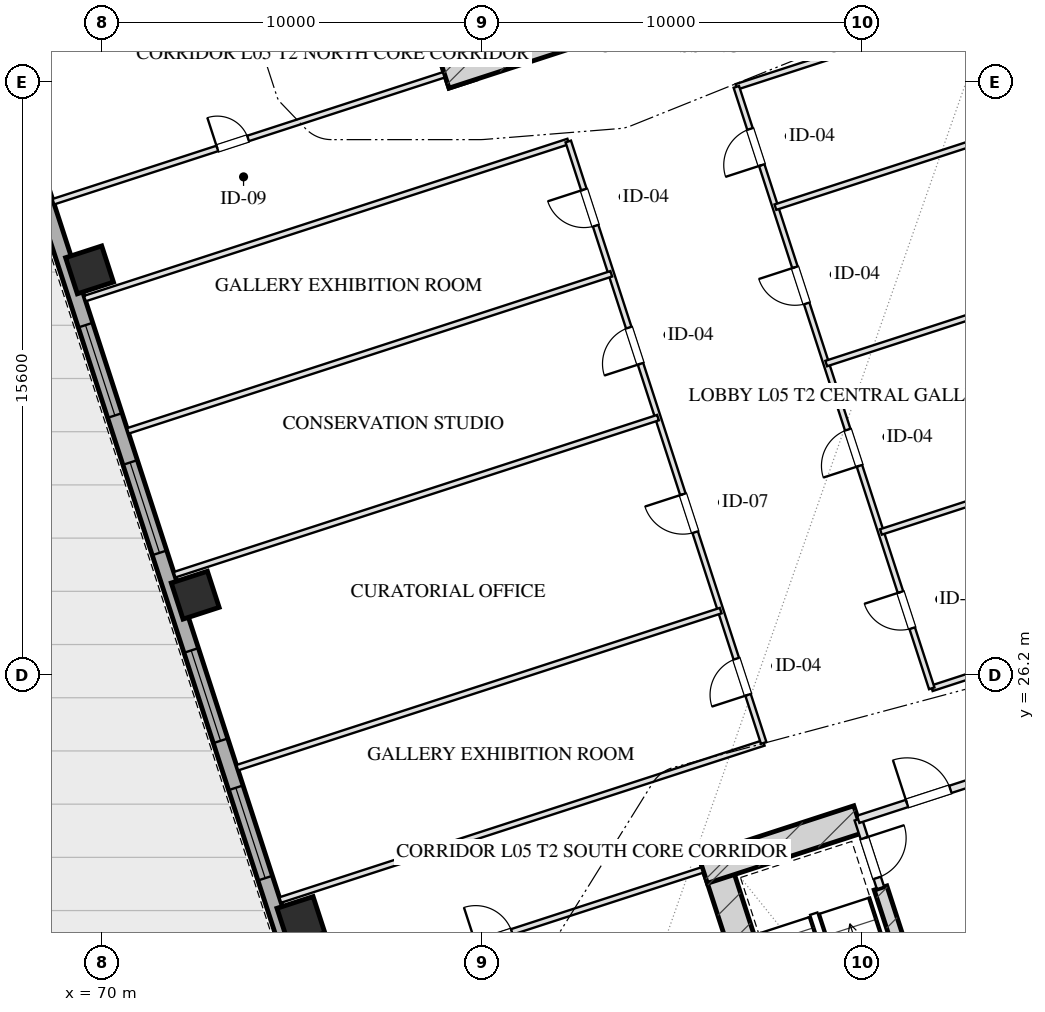
"""IFC4 building model, lengths in metres.
Left out: names, types, materials, properties, quantities, classifications, styles, units other than length and angle.
Written with IfcOpenShell. Run it as: python <this file> out.ifc"""

import sys

from ifc_helpers import new_model, si_unit, direction, frame, frame_2d, origin, origin_2d, place, context, subcontext, project, spatial, rectangle, hollow_rectangle, extrude, element, fill, save


model = new_model("IFC4")
c1 = context("Model", 3, precision=1e-05, world=origin(), true_north=direction((0.0, 1.0)))
c2 = subcontext(c1, "Body", "Model", "MODEL_VIEW")
j1 = project(units=[si_unit("LENGTHUNIT", "METRE"), si_unit("PLANEANGLEUNIT", "RADIAN")], contexts=[c1])
p1 = place(None, origin())
s1 = spatial("IfcSite", under=j1, at=p1, CompositionType="ELEMENT")
p2 = place(p1, origin())
s2 = spatial("IfcBuilding", under=s1, at=p2, CompositionType="ELEMENT")
p3 = place(p2, frame((0.0, 0.0, 26.0)))
s3 = spatial("IfcBuildingStorey", under=s2, at=p3, CompositionType="ELEMENT", Elevation=26.0)
p4 = place(p3, frame((86.055, 21.546, 0.0), z_axis=(0.0, 0.0, 1.0), x_axis=(0.309023585745, -0.951054374604, 0.0)))
e1 = element("IfcWall", 1, at=p4, inside=s3, PredefinedType="SHEAR", context=c2, shape_type="SweptSolid", body=[
    extrude(rectangle(XDim=9.63, YDim=0.75, at=frame_2d((4.815, 0.0))), origin(), (0.0, 0.0, 1.0), 4.0),
])
p5 = place(p3, frame((90.486, 20.594, 0.0), z_axis=(0.0, 0.0, 1.0), x_axis=(0.309020428229, -0.951055400562, 0.0)))
e2 = element("IfcWall", 2, at=p5, inside=s3, PredefinedType="SHEAR", context=c2, shape_type="SweptSolid", body=[
    extrude(rectangle(XDim=6.98, YDim=0.35, at=frame_2d((3.49, 0.0))), origin(), (0.0, 0.0, 1.0), 4.0),
])
p6 = place(p3, frame((85.814, 21.074, 0.0), z_axis=(0.0, 0.0, 1.0), x_axis=(0.95106580992, 0.308988390074, 0.0)))
e3 = element("IfcWall", 3, at=p6, inside=s3, PredefinedType="SHEAR", context=c2, shape_type="SweptSolid", body=[
    extrude(rectangle(XDim=4.295, YDim=0.75, at=frame_2d((2.147, 0.0))), origin(), (0.0, 0.0, 1.0), 4.0),
])
p7 = place(p3, frame((79.489, 41.756, 0.0), z_axis=(0.0, 0.0, 1.0), x_axis=(-0.309016134813, 0.951056795583, 0.0)))
e4 = element("IfcWall", 4, at=p7, inside=s3, PredefinedType="SHEAR", context=c2, shape_type="SweptSolid", body=[
    extrude(rectangle(XDim=9.63, YDim=0.75, at=frame_2d((4.815, 0.0))), origin(), (0.0, 0.0, 1.0), 4.0),
])
p8 = place(p3, frame((79.016, 41.997, 0.0), z_axis=(0.0, 0.0, 1.0), x_axis=(0.95106038264, 0.309005094736, 0.0)))
e5 = element("IfcWall", 5, at=p8, inside=s3, PredefinedType="SHEAR", context=c2, shape_type="SweptSolid", body=[
    extrude(rectangle(XDim=4.295, YDim=0.75, at=frame_2d((2.147, 0.0))), origin(), (0.0, 0.0, 1.0), 4.0),
])
for number, where, z_axis, x_axis in (
    (6, (75.234, 19.739, 0.0), (0.0, 0.0, 1.0), (0.951, 0.309, 0.0)),
    (7, (72.453, 28.299, 0.0), (0.0, 0.0, 1.0), (0.951, 0.309, 0.0)),
    (8, (69.672, 36.858, 0.0), (0.0, 0.0, 1.0), (0.951, 0.309, 0.0)),
):
    element("IfcColumn", number, at=place(p3, frame(where, z_axis=z_axis, x_axis=x_axis)), inside=s3, PredefinedType="COLUMN", context=c2, shape_type="SweptSolid", body=[
        extrude(hollow_rectangle(XDim=1.0, YDim=1.0, WallThickness=0.036, at=origin_2d()), origin(), (0.0, 0.0, 1.0), 4.001),
    ])
p9 = place(p3, frame((79.655, 4.352, 0.0), z_axis=(0.0, 0.0, 1.0), x_axis=(-0.309014526607, 0.951057318118, 0.0)))
e9 = element("IfcWall", 9, at=p9, inside=s3, PredefinedType="SOLIDWALL", context=c2, shape_type="SweptSolid", body=[
    extrude(rectangle(XDim=50.0, YDim=0.4, at=frame_2d((25.0, 0.0))), origin(), (0.0, 0.0, 1.0), 3.16),
])
p10 = place(p9, frame((17.35, 0.0, 0.75)))
e10 = element("IfcOpeningElement", 10, at=p10, cuts=e9, PredefinedType="OPENING", context=c2, shape_type="SweptSolid", body=[
    extrude(rectangle(XDim=2.5, YDim=1.75, at=frame_2d((1.25, 0.875))), frame((0.0, 0.21, 0.0), z_axis=(0.0, -1.0, 0.0), x_axis=(1.0, 0.0, 0.0)), (0.0, 0.0, 1.0), 0.42),
])
p11 = place(p9, frame((21.15, 0.0, 0.75)))
e11 = element("IfcOpeningElement", 11, at=p11, cuts=e9, PredefinedType="OPENING", context=c2, shape_type="SweptSolid", body=[
    extrude(rectangle(XDim=2.5, YDim=1.75, at=frame_2d((1.25, 0.875))), frame((0.0, 0.21, 0.0), z_axis=(0.0, -1.0, 0.0), x_axis=(1.0, 0.0, 0.0)), (0.0, 0.0, 1.0), 0.42),
])
p12 = place(p9, frame((26.35, 0.0, 0.75)))
e12 = element("IfcOpeningElement", 12, at=p12, cuts=e9, PredefinedType="OPENING", context=c2, shape_type="SweptSolid", body=[
    extrude(rectangle(XDim=2.5, YDim=1.75, at=frame_2d((1.25, 0.875))), frame((0.0, 0.21, 0.0), z_axis=(0.0, -1.0, 0.0), x_axis=(1.0, 0.0, 0.0)), (0.0, 0.0, 1.0), 0.42),
])
p13 = place(p9, frame((30.15, 0.0, 0.75)))
e13 = element("IfcOpeningElement", 13, at=p13, cuts=e9, PredefinedType="OPENING", context=c2, shape_type="SweptSolid", body=[
    extrude(rectangle(XDim=2.5, YDim=1.75, at=frame_2d((1.25, 0.875))), frame((0.0, 0.21, 0.0), z_axis=(0.0, -1.0, 0.0), x_axis=(1.0, 0.0, 0.0)), (0.0, 0.0, 1.0), 0.42),
])
p14 = place(p3, frame((89.899, 22.401, 0.0), z_axis=(0.0, 0.0, 1.0), x_axis=(0.308932062672, -0.951084108086, 0.0)))
e14 = element("IfcWall", 14, at=p14, inside=s3, PredefinedType="PARTITIONING", context=c2, shape_type="SweptSolid", body=[
    extrude(rectangle(XDim=1.9, YDim=0.2, at=frame_2d((0.95, 0.0))), origin(), (0.0, 0.0, 1.0), 3.725),
])
p15 = place(p14, frame((0.52, 0.0, 0.0)))
e15 = element("IfcOpeningElement", 15, at=p15, cuts=e14, PredefinedType="OPENING", context=c2, shape_type="SweptSolid", body=[
    extrude(rectangle(XDim=1.1, YDim=2.05, at=frame_2d((0.55, 1.025))), frame((0.0, 0.11, 0.0), z_axis=(0.0, -1.0, 0.0), x_axis=(1.0, 0.0, 0.0)), (0.0, 0.0, 1.0), 0.22),
])
p16 = place(p3, frame((89.899, 22.401, 0.0), z_axis=(0.0, 0.0, 1.0), x_axis=(0.951046716504, 0.309047153403, 0.0)))
e16 = element("IfcWall", 16, at=p16, inside=s3, PredefinedType="PARTITIONING", context=c2, shape_type="SweptSolid", body=[
    extrude(rectangle(XDim=3.83, YDim=0.2, at=frame_2d((1.915, 0.0))), origin(), (0.0, 0.0, 1.0), 3.725),
])
p17 = place(p16, frame((1.35, 0.0, 0.0)))
e17 = element("IfcOpeningElement", 17, at=p17, cuts=e16, PredefinedType="OPENING", context=c2, shape_type="SweptSolid", body=[
    extrude(rectangle(XDim=1.2, YDim=2.05, at=frame_2d((0.6, 1.025))), frame((0.0, 0.11, 0.0), z_axis=(0.0, -1.0, 0.0), x_axis=(1.0, 0.0, 0.0)), (0.0, 0.0, 1.0), 0.22),
])
p18 = place(p3, frame((75.519, 17.729, 0.0), z_axis=(0.0, 0.0, 1.0), x_axis=(0.951056658866, 0.309016555588, 0.0)))
e18 = element("IfcWall", 18, at=p18, inside=s3, PredefinedType="PARTITIONING", context=c2, shape_type="SweptSolid", body=[
    extrude(rectangle(XDim=10.8, YDim=0.15, at=frame_2d((5.4, 0.0))), origin(), (0.0, 0.0, 1.0), 3.725),
])
p19 = place(p18, frame((4.536, 0.0, 0.0)))
e19 = element("IfcOpeningElement", 19, at=p19, cuts=e18, PredefinedType="OPENING", context=c2, shape_type="SweptSolid", body=[
    extrude(rectangle(XDim=1.0, YDim=2.05, at=frame_2d((0.5, 1.025))), frame((0.0, 0.085, 0.0), z_axis=(0.0, -1.0, 0.0), x_axis=(1.0, 0.0, 0.0)), (0.0, 0.0, 1.0), 0.17),
])
p20 = place(p3, frame((68.721, 38.652, 0.0), z_axis=(0.0, 0.0, 1.0), x_axis=(0.951056658866, 0.309016555588, 0.0)))
e20 = element("IfcWall", 20, at=p20, inside=s3, PredefinedType="PARTITIONING", context=c2, shape_type="SweptSolid", body=[
    extrude(rectangle(XDim=10.8, YDim=0.15, at=frame_2d((5.4, 0.0))), origin(), (0.0, 0.0, 1.0), 3.725),
])
p21 = place(p20, frame((4.536, 0.0, 0.0)))
e21 = element("IfcOpeningElement", 21, at=p21, cuts=e20, PredefinedType="OPENING", context=c2, shape_type="SweptSolid", body=[
    extrude(rectangle(XDim=0.85, YDim=2.05, at=frame_2d((0.425, 1.025))), frame((0.0, 0.085, 0.0), z_axis=(0.0, -1.0, 0.0), x_axis=(1.0, 0.0, 0.0)), (0.0, 0.0, 1.0), 0.17),
])
p22 = place(p3, frame((74.691, 20.278, 0.0), z_axis=(0.0, 0.0, 1.0), x_axis=(0.951052712421, 0.309028701251, 0.0)))
e22 = element("IfcWall", 22, at=p22, inside=s3, PredefinedType="PARTITIONING", context=c2, shape_type="SweptSolid", body=[
    extrude(rectangle(XDim=13.375, YDim=0.15, at=frame_2d((6.688, 0.0))), origin(), (0.0, 0.0, 1.0), 3.725),
])
p23 = place(p3, frame((91.834, 25.848, 0.0), z_axis=(0.0, 0.0, 1.0), x_axis=(0.951055605195, 0.309019798438, 0.0)))
e23 = element("IfcWall", 23, at=p23, inside=s3, PredefinedType="PARTITIONING", context=c2, shape_type="SweptSolid", body=[
    extrude(rectangle(XDim=19.575, YDim=0.15, at=frame_2d((9.788, 0.0))), origin(), (0.0, 0.0, 1.0), 3.725),
])
p24 = place(p3, frame((69.549, 36.103, 0.0), z_axis=(0.0, 0.0, 1.0), x_axis=(0.951058077006, 0.309012190961, 0.0)))
e24 = element("IfcWall", 24, at=p24, inside=s3, PredefinedType="PARTITIONING", context=c2, shape_type="SweptSolid", body=[
    extrude(rectangle(XDim=13.375, YDim=0.15, at=frame_2d((6.688, 0.0))), origin(), (0.0, 0.0, 1.0), 3.725),
])
p25 = place(p3, frame((86.692, 41.673, 0.0), z_axis=(0.0, 0.0, 1.0), x_axis=(0.951055605195, 0.309019798438, 0.0)))
e25 = element("IfcWall", 25, at=p25, inside=s3, PredefinedType="PARTITIONING", context=c2, shape_type="SweptSolid", body=[
    extrude(rectangle(XDim=19.575, YDim=0.15, at=frame_2d((9.788, 0.0))), origin(), (0.0, 0.0, 1.0), 3.725),
])
p26 = place(p3, frame((87.412, 24.411, 0.0), z_axis=(0.0, 0.0, 1.0), x_axis=(-0.309022042254, 0.951054876125, 0.0)))
e26 = element("IfcWall", 26, at=p26, inside=s3, PredefinedType="PARTITIONING", context=c2, shape_type="SweptSolid", body=[
    extrude(rectangle(XDim=16.64, YDim=0.15, at=frame_2d((8.32, 0.0))), origin(), (0.0, 0.0, 1.0), 3.725),
])
p27 = place(p26, frame((1.33, 0.0, 0.0)))
e27 = element("IfcOpeningElement", 27, at=p27, cuts=e26, PredefinedType="OPENING", context=c2, shape_type="SweptSolid", body=[
    extrude(rectangle(XDim=1.0, YDim=2.05, at=frame_2d((0.5, 1.025))), frame((0.0, 0.085, 0.0), z_axis=(0.0, -1.0, 0.0), x_axis=(1.0, 0.0, 0.0)), (0.0, 0.0, 1.0), 0.17),
])
p28 = place(p26, frame((5.83, 0.0, 0.0)))
e28 = element("IfcOpeningElement", 28, at=p28, cuts=e26, PredefinedType="OPENING", context=c2, shape_type="SweptSolid", body=[
    extrude(rectangle(XDim=1.05, YDim=2.05, at=frame_2d((0.525, 1.025))), frame((0.0, 0.085, 0.0), z_axis=(0.0, -1.0, 0.0), x_axis=(1.0, 0.0, 0.0)), (0.0, 0.0, 1.0), 0.17),
])
p29 = place(p26, frame((10.49, 0.0, 0.0)))
e29 = element("IfcOpeningElement", 29, at=p29, cuts=e26, PredefinedType="OPENING", context=c2, shape_type="SweptSolid", body=[
    extrude(rectangle(XDim=1.0, YDim=2.05, at=frame_2d((0.5, 1.025))), frame((0.0, 0.085, 0.0), z_axis=(0.0, -1.0, 0.0), x_axis=(1.0, 0.0, 0.0)), (0.0, 0.0, 1.0), 0.17),
])
p30 = place(p26, frame((14.31, 0.0, 0.0)))
e30 = element("IfcOpeningElement", 30, at=p30, cuts=e26, PredefinedType="OPENING", context=c2, shape_type="SweptSolid", body=[
    extrude(rectangle(XDim=1.0, YDim=2.05, at=frame_2d((0.5, 1.025))), frame((0.0, 0.085, 0.0), z_axis=(0.0, -1.0, 0.0), x_axis=(1.0, 0.0, 0.0)), (0.0, 0.0, 1.0), 0.17),
])
p31 = place(p3, frame((91.834, 25.848, 0.0), z_axis=(0.0, 0.0, 1.0), x_axis=(-0.30901773025, 0.951056277195, 0.0)))
e31 = element("IfcWall", 31, at=p31, inside=s3, PredefinedType="PARTITIONING", context=c2, shape_type="SweptSolid", body=[
    extrude(rectangle(XDim=16.64, YDim=0.15, at=frame_2d((8.32, 0.0))), origin(), (0.0, 0.0, 1.0), 3.725),
])
p32 = place(p31, frame((1.663, 0.0, 0.0)))
e32 = element("IfcOpeningElement", 32, at=p32, cuts=e31, PredefinedType="OPENING", context=c2, shape_type="SweptSolid", body=[
    extrude(rectangle(XDim=1.0, YDim=2.05, at=frame_2d((0.5, 1.025))), frame((0.0, 0.085, 0.0), z_axis=(0.0, -1.0, 0.0), x_axis=(1.0, 0.0, 0.0)), (0.0, 0.0, 1.0), 0.17),
])
p33 = place(p31, frame((6.156, 0.0, 0.0)))
e33 = element("IfcOpeningElement", 33, at=p33, cuts=e31, PredefinedType="OPENING", context=c2, shape_type="SweptSolid", body=[
    extrude(rectangle(XDim=1.0, YDim=2.05, at=frame_2d((0.5, 1.025))), frame((0.0, 0.085, 0.0), z_axis=(0.0, -1.0, 0.0), x_axis=(1.0, 0.0, 0.0)), (0.0, 0.0, 1.0), 0.17),
])
p34 = place(p31, frame((10.649, 0.0, 0.0)))
e34 = element("IfcOpeningElement", 34, at=p34, cuts=e31, PredefinedType="OPENING", context=c2, shape_type="SweptSolid", body=[
    extrude(rectangle(XDim=1.0, YDim=2.05, at=frame_2d((0.5, 1.025))), frame((0.0, 0.085, 0.0), z_axis=(0.0, -1.0, 0.0), x_axis=(1.0, 0.0, 0.0)), (0.0, 0.0, 1.0), 0.17),
])
p35 = place(p31, frame((14.476, 0.0, 0.0)))
e35 = element("IfcOpeningElement", 35, at=p35, cuts=e31, PredefinedType="OPENING", context=c2, shape_type="SweptSolid", body=[
    extrude(rectangle(XDim=1.0, YDim=2.05, at=frame_2d((0.5, 1.025))), frame((0.0, 0.085, 0.0), z_axis=(0.0, -1.0, 0.0), x_axis=(1.0, 0.0, 0.0)), (0.0, 0.0, 1.0), 0.17),
])
for number, where, z_axis, x_axis in (
    (36, (73.56, 23.759, 0.0), (0.0, 0.0, 1.0), (0.951, 0.309, 0.0)),
    (37, (71.91, 28.837, 0.0), (0.0, 0.0, 1.0), (0.951, 0.309, 0.0)),
):
    element("IfcWall", number, at=place(p3, frame(where, z_axis=z_axis, x_axis=x_axis)), inside=s3, PredefinedType="PARTITIONING", context=c2, shape_type="SweptSolid", body=[
        extrude(rectangle(XDim=13.375, YDim=0.15, at=frame_2d((6.688, 0.0))), origin(), (0.0, 0.0, 1.0), 3.725),
    ])
p36 = place(p3, frame((70.68, 32.622, 0.0), z_axis=(0.0, 0.0, 1.0), x_axis=(0.951056333968, 0.309017555521, 0.0)))
e38 = element("IfcWall", 38, at=p36, inside=s3, PredefinedType="PARTITIONING", context=c2, shape_type="SweptSolid", body=[
    extrude(rectangle(XDim=13.375, YDim=0.15, at=frame_2d((6.688, 0.0))), origin(), (0.0, 0.0, 1.0), 3.725),
])
for number, where, z_axis, x_axis in (
    (39, (90.497, 29.962, 0.0), (0.0, 0.0, 1.0), (0.951, 0.309, 0.0)),
    (40, (89.057, 34.394, 0.0), (0.0, 0.0, 1.0), (0.951, 0.309, 0.0)),
    (41, (87.72, 38.508, 0.0), (0.0, 0.0, 1.0), (0.951, 0.309, 0.0)),
):
    element("IfcWall", number, at=place(p3, frame(where, z_axis=z_axis, x_axis=x_axis)), inside=s3, PredefinedType="PARTITIONING", context=c2, shape_type="SweptSolid", body=[
        extrude(rectangle(XDim=19.575, YDim=0.15, at=frame_2d((9.788, 0.0))), origin(), (0.0, 0.0, 1.0), 3.725),
    ])
p37 = place(p10, origin())
e42 = element("IfcWindow", 42, at=p37, inside=s3, PartitioningType="TRIPLE_PANEL_VERTICAL", PredefinedType="WINDOW", context=c2, shape_type="SweptSolid", body=[
    extrude(rectangle(XDim=2.5, YDim=1.75, at=frame_2d((1.25, 0.875))), frame((0.0, 0.03, 0.0), z_axis=(0.0, -1.0, 0.0), x_axis=(1.0, 0.0, 0.0)), (0.0, 0.0, 1.0), 0.06),
])
fill(e10, e42)
p38 = place(p11, origin())
e43 = element("IfcWindow", 43, at=p38, inside=s3, PartitioningType="TRIPLE_PANEL_VERTICAL", PredefinedType="WINDOW", context=c2, shape_type="SweptSolid", body=[
    extrude(rectangle(XDim=2.5, YDim=1.75, at=frame_2d((1.25, 0.875))), frame((0.0, 0.03, 0.0), z_axis=(0.0, -1.0, 0.0), x_axis=(1.0, 0.0, 0.0)), (0.0, 0.0, 1.0), 0.06),
])
fill(e11, e43)
p39 = place(p12, origin())
e44 = element("IfcWindow", 44, at=p39, inside=s3, PartitioningType="TRIPLE_PANEL_VERTICAL", PredefinedType="WINDOW", context=c2, shape_type="SweptSolid", body=[
    extrude(rectangle(XDim=2.5, YDim=1.75, at=frame_2d((1.25, 0.875))), frame((0.0, 0.03, 0.0), z_axis=(0.0, -1.0, 0.0), x_axis=(1.0, 0.0, 0.0)), (0.0, 0.0, 1.0), 0.06),
])
fill(e12, e44)
p40 = place(p13, origin())
e45 = element("IfcWindow", 45, at=p40, inside=s3, PartitioningType="TRIPLE_PANEL_VERTICAL", PredefinedType="WINDOW", context=c2, shape_type="SweptSolid", body=[
    extrude(rectangle(XDim=2.5, YDim=1.75, at=frame_2d((1.25, 0.875))), frame((0.0, 0.03, 0.0), z_axis=(0.0, -1.0, 0.0), x_axis=(1.0, 0.0, 0.0)), (0.0, 0.0, 1.0), 0.06),
])
fill(e13, e45)
p41 = place(p15, origin())
e46 = element("IfcDoor", 46, at=p41, inside=s3, OperationType="SINGLE_SWING_LEFT", PredefinedType="DOOR", context=c2, shape_type="SweptSolid", body=[
    extrude(rectangle(XDim=1.1, YDim=2.05, at=frame_2d((0.55, 1.025))), frame((0.0, 0.025, 0.0), z_axis=(0.0, -1.0, 0.0), x_axis=(1.0, 0.0, 0.0)), (0.0, 0.0, 1.0), 0.05),
])
fill(e15, e46)
p42 = place(p17, origin())
e47 = element("IfcDoor", 47, at=p42, inside=s3, OperationType="SINGLE_SWING_LEFT", PredefinedType="DOOR", context=c2, shape_type="SweptSolid", body=[
    extrude(rectangle(XDim=1.2, YDim=2.05, at=frame_2d((0.6, 1.025))), frame((0.0, 0.025, 0.0), z_axis=(0.0, -1.0, 0.0), x_axis=(1.0, 0.0, 0.0)), (0.0, 0.0, 1.0), 0.05),
])
fill(e17, e47)
p43 = place(p19, origin())
e48 = element("IfcDoor", 48, at=p43, inside=s3, OperationType="SINGLE_SWING_LEFT", PredefinedType="DOOR", context=c2, shape_type="SweptSolid", body=[
    extrude(rectangle(XDim=1.0, YDim=2.05, at=frame_2d((0.5, 1.025))), frame((0.0, 0.025, 0.0), z_axis=(0.0, -1.0, 0.0), x_axis=(1.0, 0.0, 0.0)), (0.0, 0.0, 1.0), 0.05),
])
fill(e19, e48)
p44 = place(p21, origin())
e49 = element("IfcDoor", 49, at=p44, inside=s3, OperationType="SINGLE_SWING_LEFT", PredefinedType="DOOR", context=c2, shape_type="SweptSolid", body=[
    extrude(rectangle(XDim=0.85, YDim=2.05, at=frame_2d((0.425, 1.025))), frame((0.0, 0.025, 0.0), z_axis=(0.0, -1.0, 0.0), x_axis=(1.0, 0.0, 0.0)), (0.0, 0.0, 1.0), 0.05),
])
fill(e21, e49)
p45 = place(p27, origin())
e50 = element("IfcDoor", 50, at=p45, inside=s3, OperationType="SINGLE_SWING_LEFT", PredefinedType="DOOR", context=c2, shape_type="SweptSolid", body=[
    extrude(rectangle(XDim=1.0, YDim=2.05, at=frame_2d((0.5, 1.025))), frame((0.0, 0.025, 0.0), z_axis=(0.0, -1.0, 0.0), x_axis=(1.0, 0.0, 0.0)), (0.0, 0.0, 1.0), 0.05),
])
fill(e27, e50)
p46 = place(p28, origin())
e51 = element("IfcDoor", 51, at=p46, inside=s3, OperationType="SINGLE_SWING_RIGHT", PredefinedType="DOOR", context=c2, shape_type="SweptSolid", body=[
    extrude(rectangle(XDim=1.05, YDim=2.05, at=frame_2d((0.525, 1.025))), frame((0.0, 0.025, 0.0), z_axis=(0.0, -1.0, 0.0), x_axis=(1.0, 0.0, 0.0)), (0.0, 0.0, 1.0), 0.05),
])
fill(e28, e51)
p47 = place(p29, origin())
e52 = element("IfcDoor", 52, at=p47, inside=s3, OperationType="SINGLE_SWING_LEFT", PredefinedType="DOOR", context=c2, shape_type="SweptSolid", body=[
    extrude(rectangle(XDim=1.0, YDim=2.05, at=frame_2d((0.5, 1.025))), frame((0.0, 0.025, 0.0), z_axis=(0.0, -1.0, 0.0), x_axis=(1.0, 0.0, 0.0)), (0.0, 0.0, 1.0), 0.05),
])
fill(e29, e52)
p48 = place(p30, origin())
e53 = element("IfcDoor", 53, at=p48, inside=s3, OperationType="SINGLE_SWING_RIGHT", PredefinedType="DOOR", context=c2, shape_type="SweptSolid", body=[
    extrude(rectangle(XDim=1.0, YDim=2.05, at=frame_2d((0.5, 1.025))), frame((0.0, 0.025, 0.0), z_axis=(0.0, -1.0, 0.0), x_axis=(1.0, 0.0, 0.0)), (0.0, 0.0, 1.0), 0.05),
])
fill(e30, e53)
p49 = place(p32, origin())
e54 = element("IfcDoor", 54, at=p49, inside=s3, OperationType="SINGLE_SWING_RIGHT", PredefinedType="DOOR", context=c2, shape_type="SweptSolid", body=[
    extrude(rectangle(XDim=1.0, YDim=2.05, at=frame_2d((0.5, 1.025))), frame((0.0, 0.025, 0.0), z_axis=(0.0, -1.0, 0.0), x_axis=(1.0, 0.0, 0.0)), (0.0, 0.0, 1.0), 0.05),
])
fill(e32, e54)
p50 = place(p33, origin())
e55 = element("IfcDoor", 55, at=p50, inside=s3, OperationType="SINGLE_SWING_LEFT", PredefinedType="DOOR", context=c2, shape_type="SweptSolid", body=[
    extrude(rectangle(XDim=1.0, YDim=2.05, at=frame_2d((0.5, 1.025))), frame((0.0, 0.025, 0.0), z_axis=(0.0, -1.0, 0.0), x_axis=(1.0, 0.0, 0.0)), (0.0, 0.0, 1.0), 0.05),
])
fill(e33, e55)
p51 = place(p34, origin())
e56 = element("IfcDoor", 56, at=p51, inside=s3, OperationType="SINGLE_SWING_RIGHT", PredefinedType="DOOR", context=c2, shape_type="SweptSolid", body=[
    extrude(rectangle(XDim=1.0, YDim=2.05, at=frame_2d((0.5, 1.025))), frame((0.0, 0.025, 0.0), z_axis=(0.0, -1.0, 0.0), x_axis=(1.0, 0.0, 0.0)), (0.0, 0.0, 1.0), 0.05),
])
fill(e34, e56)
p52 = place(p35, origin())
e57 = element("IfcDoor", 57, at=p52, inside=s3, OperationType="SINGLE_SWING_LEFT", PredefinedType="DOOR", context=c2, shape_type="SweptSolid", body=[
    extrude(rectangle(XDim=1.0, YDim=2.05, at=frame_2d((0.5, 1.025))), frame((0.0, 0.025, 0.0), z_axis=(0.0, -1.0, 0.0), x_axis=(1.0, 0.0, 0.0)), (0.0, 0.0, 1.0), 0.05),
])
fill(e35, e57)
save(model, sys.argv[1])
